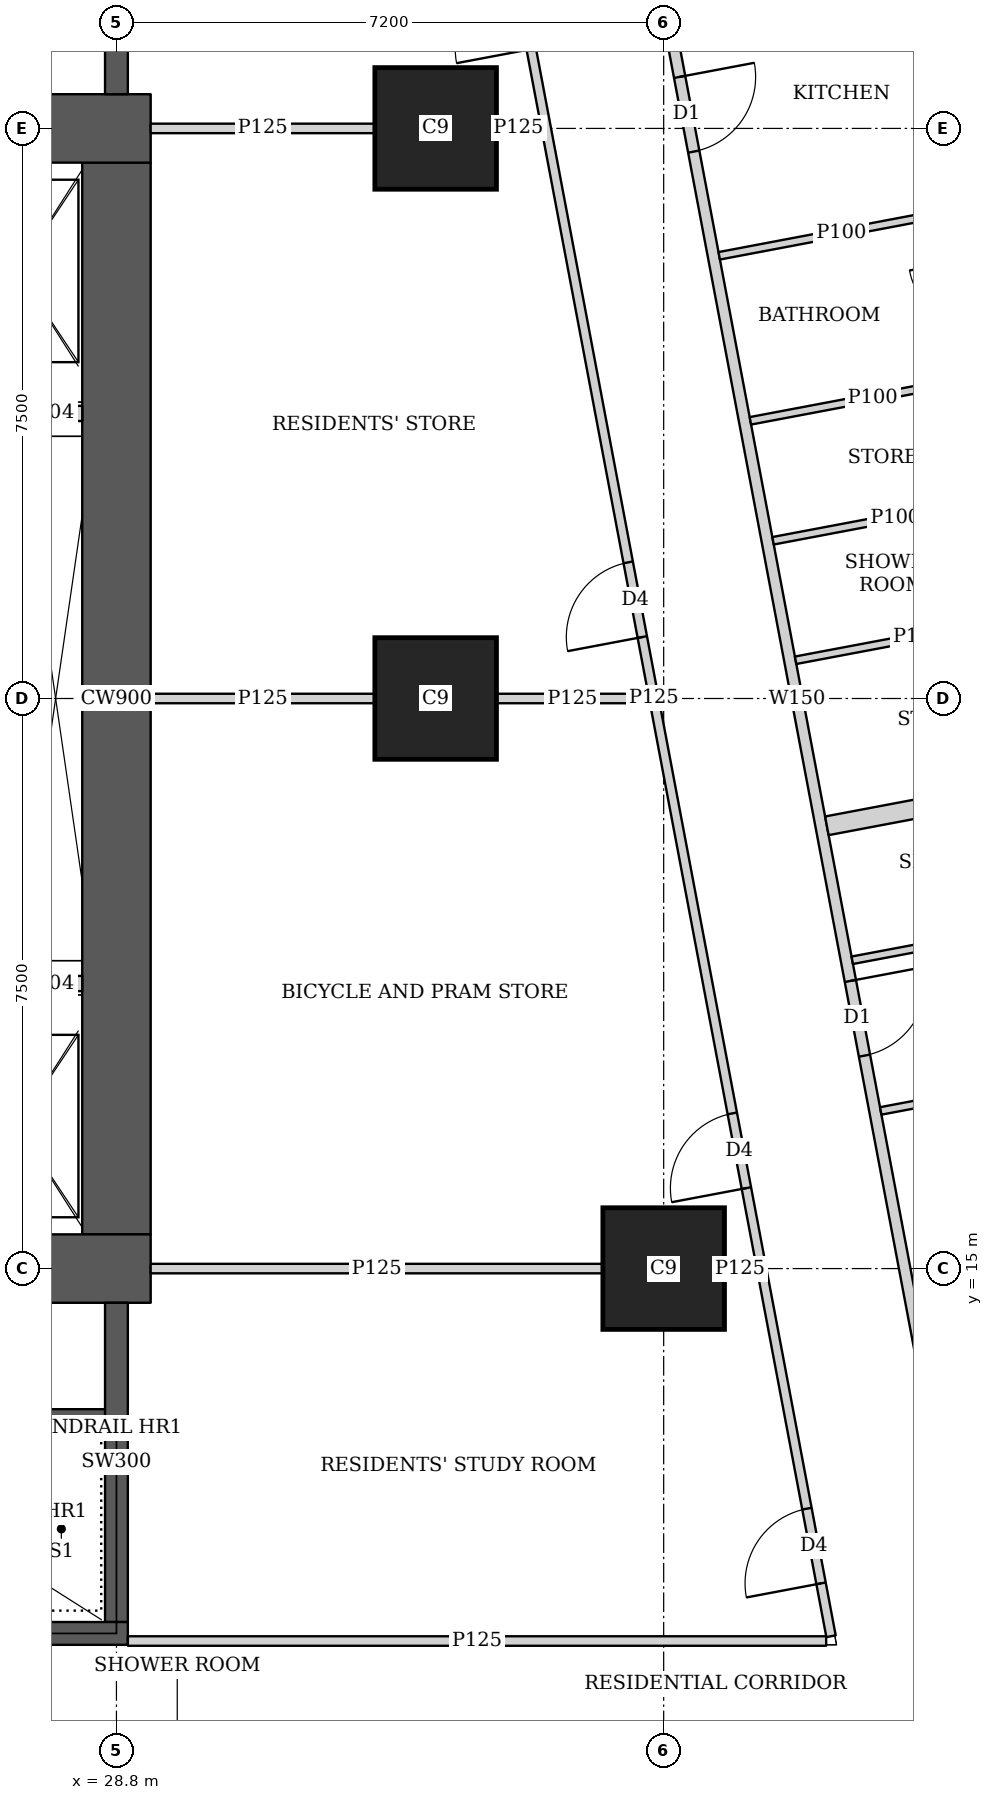
"""IFC4 building model, lengths in metres.
Left out: names, types, materials, properties, quantities, classifications, styles, units other than length and angle.
Written with IfcOpenShell. Run it as: python <this file> out.ifc"""

import sys

from ifc_helpers import new_model, si_unit, direction, frame, frame_2d, origin, origin_2d, place, context, subcontext, project, spatial, rectangle, extrude, element, fill, save


model = new_model("IFC4")
c1 = context("Model", 3, precision=1e-05, world=origin(), true_north=direction((0.0, 1.0)))
c2 = subcontext(c1, "Body", "Model", "MODEL_VIEW")
j1 = project(units=[si_unit("LENGTHUNIT", "METRE"), si_unit("PLANEANGLEUNIT", "RADIAN")], contexts=[c1])
p1 = place(None, origin())
s1 = spatial("IfcSite", under=j1, at=p1, CompositionType="ELEMENT")
p2 = place(p1, origin())
s2 = spatial("IfcBuilding", under=s1, at=p2, CompositionType="ELEMENT")
p3 = place(p2, frame((0.0, 0.0, 100.4)))
s3 = spatial("IfcBuildingStorey", under=s2, at=p3, CompositionType="ELEMENT", Elevation=100.4)
for number, where, z_axis, x_axis in (
    (1, (36.0, 15.0, 0.0), (0.0, 0.0, 1.0), (1.0, 0.0, 0.0)),
    (2, (33.0, 22.5, 0.0), (0.0, 0.0, 1.0), (1.0, 0.0, 0.0)),
    (3, (33.0, 30.0, 0.0), (0.0, 0.0, 1.0), (1.0, 0.0, 0.0)),
):
    element("IfcColumn", number, at=place(p3, frame(where, z_axis=z_axis, x_axis=x_axis)), inside=s3, PredefinedType="COLUMN", context=c2, shape_type="SweptSolid", body=[
        extrude(rectangle(XDim=1.6, YDim=1.6, at=origin_2d()), origin(), (0.0, 0.0, 1.0), 3.75),
    ])
p4 = place(p3, frame((13.95, 15.0, 0.0), z_axis=(0.0, 0.0, 1.0), x_axis=(1.0, 0.0, 0.0)))
e4 = element("IfcWall", 4, at=p4, inside=s3, PredefinedType="SHEAR", context=c2, shape_type="SweptSolid", body=[
    extrude(rectangle(XDim=15.3, YDim=0.9, at=frame_2d((7.65, 0.0))), origin(), (0.0, 0.0, 1.0), 3.75),
])
p5 = place(p4, frame((4.45, 0.0, 0.0)))
e5 = element("IfcOpeningElement", 5, at=p5, cuts=e4, PredefinedType="OPENING", context=c2, shape_type="SweptSolid", body=[
    extrude(rectangle(XDim=1.8, YDim=2.1, at=frame_2d((0.9, 1.05))), frame((0.0, 0.46, 0.0), z_axis=(0.0, -1.0, 0.0), x_axis=(1.0, 0.0, 0.0)), (0.0, 0.0, 1.0), 0.92),
])
p6 = place(p4, frame((10.7, 0.0, 0.0)))
e6 = element("IfcOpeningElement", 6, at=p6, cuts=e4, PredefinedType="OPENING", context=c2, shape_type="SweptSolid", body=[
    extrude(rectangle(XDim=1.1, YDim=2.1, at=frame_2d((0.55, 1.05))), frame((0.0, 0.46, 0.0), z_axis=(0.0, -1.0, 0.0), x_axis=(1.0, 0.0, 0.0)), (0.0, 0.0, 1.0), 0.92),
])
p7 = place(p3, frame((13.95, 30.0, 0.0), z_axis=(0.0, 0.0, 1.0), x_axis=(1.0, 0.0, 0.0)))
e7 = element("IfcWall", 7, at=p7, inside=s3, PredefinedType="SHEAR", context=c2, shape_type="SweptSolid", body=[
    extrude(rectangle(XDim=15.3, YDim=0.9, at=frame_2d((7.65, 0.0))), origin(), (0.0, 0.0, 1.0), 3.75),
])
p8 = place(p7, frame((4.45, 0.0, 0.0)))
e8 = element("IfcOpeningElement", 8, at=p8, cuts=e7, PredefinedType="OPENING", context=c2, shape_type="SweptSolid", body=[
    extrude(rectangle(XDim=1.8, YDim=2.1, at=frame_2d((0.9, 1.05))), frame((0.0, 0.46, 0.0), z_axis=(0.0, -1.0, 0.0), x_axis=(1.0, 0.0, 0.0)), (0.0, 0.0, 1.0), 0.92),
])
p9 = place(p7, frame((10.7, 0.0, 0.0)))
e9 = element("IfcOpeningElement", 9, at=p9, cuts=e7, PredefinedType="OPENING", context=c2, shape_type="SweptSolid", body=[
    extrude(rectangle(XDim=1.1, YDim=2.1, at=frame_2d((0.55, 1.05))), frame((0.0, 0.46, 0.0), z_axis=(0.0, -1.0, 0.0), x_axis=(1.0, 0.0, 0.0)), (0.0, 0.0, 1.0), 0.92),
])
p10 = place(p3, frame((28.8, 15.45, 0.0), z_axis=(0.0, 0.0, 1.0), x_axis=(0.0, 1.0, 0.0)))
e10 = element("IfcWall", 10, at=p10, inside=s3, PredefinedType="SHEAR", context=c2, shape_type="SweptSolid", body=[
    extrude(rectangle(XDim=14.1, YDim=0.9, at=frame_2d((7.05, 0.0))), origin(), (0.0, 0.0, 1.0), 3.75),
])
p11 = place(p3, frame((21.45, 10.2, 0.0), z_axis=(0.0, 0.0, 1.0), x_axis=(1.0, 0.0, 0.0)))
e11 = element("IfcWall", 11, at=p11, inside=s3, PredefinedType="SHEAR", context=c2, shape_type="SweptSolid", body=[
    extrude(rectangle(XDim=7.5, YDim=0.3, at=frame_2d((3.75, 0.0))), origin(), (0.0, 0.0, 1.0), 3.75),
])
p12 = place(p11, frame((0.5, 0.0, 0.0)))
e12 = element("IfcOpeningElement", 12, at=p12, cuts=e11, PredefinedType="OPENING", context=c2, shape_type="SweptSolid", body=[
    extrude(rectangle(XDim=1.1, YDim=2.1, at=frame_2d((0.55, 1.05))), frame((0.0, 0.16, 0.0), z_axis=(0.0, -1.0, 0.0), x_axis=(1.0, 0.0, 0.0)), (0.0, 0.0, 1.0), 0.32),
])
for number, where, z_axis, x_axis in (
    (13, (28.8, 10.35, 0.0), (0.0, 0.0, 1.0), (0.0, 1.0, 0.0)),
    (14, (28.8, 30.45, 0.0), (0.0, 0.0, 1.0), (0.0, 1.0, 0.0)),
):
    element("IfcWall", number, at=place(p3, frame(where, z_axis=z_axis, x_axis=x_axis)), inside=s3, PredefinedType="SHEAR", context=c2, shape_type="SweptSolid", body=[
        extrude(rectangle(XDim=4.2, YDim=0.3, at=frame_2d((2.1, 0.0))), origin(), (0.0, 0.0, 1.0), 3.75),
    ])
p13 = place(p3, frame((33.382, 45.65, 0.0), z_axis=(0.0, 0.0, 1.0), x_axis=(0.185593544777, -0.982626600565, 0.0)))
e15 = element("IfcWall", 15, at=p13, inside=s3, PredefinedType="SOLIDWALL", context=c2, shape_type="SweptSolid", body=[
    extrude(rectangle(XDim=47.118, YDim=0.15, at=frame_2d((23.559, 0.0))), origin(), (0.0, 0.0, 1.0), 2.2),
])
p14 = place(p13, frame((10.662, 0.0, 0.0)))
e16 = element("IfcOpeningElement", 16, at=p14, cuts=e15, PredefinedType="OPENING", context=c2, shape_type="SweptSolid", body=[
    extrude(rectangle(XDim=1.0, YDim=2.1, at=frame_2d((0.5, 1.05))), frame((0.0, 0.085, 0.0), z_axis=(0.0, -1.0, 0.0), x_axis=(1.0, 0.0, 0.0)), (0.0, 0.0, 1.0), 0.17),
])
p15 = place(p13, frame((15.237, 0.0, 0.0)))
e17 = element("IfcOpeningElement", 17, at=p15, cuts=e15, PredefinedType="OPENING", context=c2, shape_type="SweptSolid", body=[
    extrude(rectangle(XDim=1.0, YDim=2.1, at=frame_2d((0.5, 1.05))), frame((0.0, 0.085, 0.0), z_axis=(0.0, -1.0, 0.0), x_axis=(1.0, 0.0, 0.0)), (0.0, 0.0, 1.0), 0.17),
])
p16 = place(p13, frame((27.341, 0.0, 0.0)))
e18 = element("IfcOpeningElement", 18, at=p16, cuts=e15, PredefinedType="OPENING", context=c2, shape_type="SweptSolid", body=[
    extrude(rectangle(XDim=1.0, YDim=2.1, at=frame_2d((0.5, 1.05))), frame((0.0, 0.085, 0.0), z_axis=(0.0, -1.0, 0.0), x_axis=(1.0, 0.0, 0.0)), (0.0, 0.0, 1.0), 0.17),
])
p17 = place(p13, frame((33.833, 0.0, 0.0)))
e19 = element("IfcOpeningElement", 19, at=p17, cuts=e15, PredefinedType="OPENING", context=c2, shape_type="SweptSolid", body=[
    extrude(rectangle(XDim=1.0, YDim=2.1, at=frame_2d((0.5, 1.05))), frame((0.0, 0.085, 0.0), z_axis=(0.0, -1.0, 0.0), x_axis=(1.0, 0.0, 0.0)), (0.0, 0.0, 1.0), 0.17),
])
p18 = place(p3, frame((39.948, 28.933, 0.0), z_axis=(0.0, 0.0, 1.0), x_axis=(-0.982542259571, -0.186039533857, 0.0)))
e20 = element("IfcWall", 20, at=p18, inside=s3, PredefinedType="PARTITIONING", context=c2, shape_type="SweptSolid", body=[
    extrude(rectangle(XDim=3.274, YDim=0.1, at=frame_2d((1.637, 0.0))), origin(), (0.0, 0.0, 1.0), 3.5),
])
p19 = place(p3, frame((40.656, 25.183, 0.0), z_axis=(0.0, 0.0, 1.0), x_axis=(-0.982596739811, -0.18575157311, 0.0)))
e21 = element("IfcWall", 21, at=p19, inside=s3, PredefinedType="PARTITIONING", context=c2, shape_type="SweptSolid", body=[
    extrude(rectangle(XDim=3.274, YDim=0.1, at=frame_2d((1.637, 0.0))), origin(), (0.0, 0.0, 1.0), 3.5),
])
p20 = place(p3, frame((40.358, 26.761, 0.0), z_axis=(0.0, 0.0, 1.0), x_axis=(-0.982607776398, -0.185693181787, 0.0)))
e22 = element("IfcWall", 22, at=p20, inside=s3, PredefinedType="PARTITIONING", context=c2, shape_type="SweptSolid", body=[
    extrude(rectangle(XDim=3.274, YDim=0.1, at=frame_2d((1.637, 0.0))), origin(), (0.0, 0.0, 1.0), 3.5),
])
p21 = place(p3, frame((40.954, 23.61, 0.0), z_axis=(0.0, 0.0, 1.0), x_axis=(-0.982661397469, -0.185409217473, 0.0)))
e23 = element("IfcWall", 23, at=p21, inside=s3, PredefinedType="PARTITIONING", context=c2, shape_type="SweptSolid", body=[
    extrude(rectangle(XDim=3.275, YDim=0.1, at=frame_2d((1.637, 0.0))), origin(), (0.0, 0.0, 1.0), 2.5),
])
p22 = place(p3, frame((41.798, 19.682, 0.0), z_axis=(0.0, 0.0, 1.0), x_axis=(-0.982656183703, -0.185436848091, 0.0)))
e24 = element("IfcWall", 24, at=p22, inside=s3, PredefinedType="PARTITIONING", context=c2, shape_type="SweptSolid", body=[
    extrude(rectangle(XDim=3.376, YDim=0.1, at=frame_2d((1.688, 0.0))), origin(), (0.0, 0.0, 1.0), 3.5),
])
p23 = place(p3, frame((42.074, 17.682, 0.0), z_axis=(0.0, 0.0, 1.0), x_axis=(-0.982620626894, -0.185625169636, 0.0)))
e25 = element("IfcWall", 25, at=p23, inside=s3, PredefinedType="PARTITIONING", context=c2, shape_type="SweptSolid", body=[
    extrude(rectangle(XDim=3.275, YDim=0.1, at=frame_2d((1.637, 0.0))), origin(), (0.0, 0.0, 1.0), 3.5),
])
p24 = place(p23, frame((1.201, 0.0, 0.0)))
e26 = element("IfcOpeningElement", 26, at=p24, cuts=e25, PredefinedType="OPENING", context=c2, shape_type="SweptSolid", body=[
    extrude(rectangle(XDim=0.9, YDim=2.1, at=frame_2d((0.45, 1.05))), frame((0.0, 0.06, 0.0), z_axis=(0.0, -1.0, 0.0), x_axis=(1.0, 0.0, 0.0)), (0.0, 0.0, 1.0), 0.12),
])
p25 = place(p3, frame((42.593, 21.665, 0.0), z_axis=(0.0, 0.0, 1.0), x_axis=(-0.982612837616, -0.185666398014, 0.0)))
e27 = element("IfcWall", 27, at=p25, inside=s3, PredefinedType="SOLIDWALL", context=c2, shape_type="SweptSolid", body=[
    extrude(rectangle(XDim=4.525, YDim=0.25, at=frame_2d((2.262, 0.0))), origin(), (0.0, 0.0, 1.0), 2.5),
])
p26 = place(p3, frame((28.95, 10.1, 0.0), z_axis=(0.0, 0.0, 1.0), x_axis=(1.0, 0.0, 0.0)))
e28 = element("IfcWall", 28, at=p26, inside=s3, PredefinedType="PARTITIONING", context=c2, shape_type="SweptSolid", body=[
    extrude(rectangle(XDim=9.188, YDim=0.125, at=frame_2d((4.594, 0.0))), origin(), (0.0, 0.0, 1.0), 3.5),
])
p27 = place(p3, frame((38.202, 10.163, 0.0), z_axis=(0.0, 0.0, 1.0), x_axis=(-0.185610321132, 0.982623431783, 0.0)))
e29 = element("IfcWall", 29, at=p27, inside=s3, PredefinedType="PARTITIONING", context=c2, shape_type="SweptSolid", body=[
    extrude(rectangle(XDim=25.111, YDim=0.125, at=frame_2d((12.556, 0.0))), origin(), (0.0, 0.0, 1.0), 2.5),
])
p28 = place(p27, frame((0.708, 0.0, 0.0)))
e30 = element("IfcOpeningElement", 30, at=p28, cuts=e29, PredefinedType="OPENING", context=c2, shape_type="SweptSolid", body=[
    extrude(rectangle(XDim=1.0, YDim=2.1, at=frame_2d((0.5, 1.05))), frame((0.0, 0.073, 0.0), z_axis=(0.0, -1.0, 0.0), x_axis=(1.0, 0.0, 0.0)), (0.0, 0.0, 1.0), 0.145),
])
p29 = place(p27, frame((6.0, 0.0, 0.0)))
e31 = element("IfcOpeningElement", 31, at=p29, cuts=e29, PredefinedType="OPENING", context=c2, shape_type="SweptSolid", body=[
    extrude(rectangle(XDim=1.0, YDim=2.1, at=frame_2d((0.5, 1.05))), frame((0.0, 0.073, 0.0), z_axis=(0.0, -1.0, 0.0), x_axis=(1.0, 0.0, 0.0)), (0.0, 0.0, 1.0), 0.145),
])
p30 = place(p27, frame((13.378, 0.0, 0.0)))
e32 = element("IfcOpeningElement", 32, at=p30, cuts=e29, PredefinedType="OPENING", context=c2, shape_type="SweptSolid", body=[
    extrude(rectangle(XDim=1.0, YDim=2.1, at=frame_2d((0.5, 1.05))), frame((0.0, 0.073, 0.0), z_axis=(0.0, -1.0, 0.0), x_axis=(1.0, 0.0, 0.0)), (0.0, 0.0, 1.0), 0.145),
])
p31 = place(p27, frame((21.25, 0.0, 0.0)))
e33 = element("IfcOpeningElement", 33, at=p31, cuts=e29, PredefinedType="OPENING", context=c2, shape_type="SweptSolid", body=[
    extrude(rectangle(XDim=1.0, YDim=2.1, at=frame_2d((0.5, 1.05))), frame((0.0, 0.073, 0.0), z_axis=(0.0, -1.0, 0.0), x_axis=(1.0, 0.0, 0.0)), (0.0, 0.0, 1.0), 0.145),
])
p32 = place(p3, frame((29.25, 15.0, 0.0), z_axis=(0.0, 0.0, 1.0), x_axis=(1.0, 0.0, 0.0)))
e34 = element("IfcWall", 34, at=p32, inside=s3, PredefinedType="PARTITIONING", context=c2, shape_type="SweptSolid", body=[
    extrude(rectangle(XDim=5.949, YDim=0.125, at=frame_2d((2.975, 0.0))), origin(), (0.0, 0.0, 1.0), 3.5),
])
p33 = place(p3, frame((36.801, 15.0, 0.0), z_axis=(0.0, 0.0, 1.0), x_axis=(1.0, 0.0, 0.0)))
e35 = element("IfcWall", 35, at=p33, inside=s3, PredefinedType="PARTITIONING", context=c2, shape_type="SweptSolid", body=[
    extrude(rectangle(XDim=0.412, YDim=0.125, at=frame_2d((0.206, 0.0))), origin(), (0.0, 0.0, 1.0), 3.5),
])
p34 = place(p3, frame((29.25, 22.5, 0.0), z_axis=(0.0, 0.0, 1.0), x_axis=(1.0, 0.0, 0.0)))
e36 = element("IfcWall", 36, at=p34, inside=s3, PredefinedType="PARTITIONING", context=c2, shape_type="SweptSolid", body=[
    extrude(rectangle(XDim=2.949, YDim=0.125, at=frame_2d((1.475, 0.0))), origin(), (0.0, 0.0, 1.0), 3.5),
])
p35 = place(p3, frame((33.801, 22.5, 0.0), z_axis=(0.0, 0.0, 1.0), x_axis=(1.0, 0.0, 0.0)))
e37 = element("IfcWall", 37, at=p35, inside=s3, PredefinedType="PARTITIONING", context=c2, shape_type="SweptSolid", body=[
    extrude(rectangle(XDim=1.995, YDim=0.125, at=frame_2d((0.998, 0.0))), origin(), (0.0, 0.0, 1.0), 2.5),
])
p36 = place(p3, frame((29.25, 30.0, 0.0), z_axis=(0.0, 0.0, 1.0), x_axis=(1.0, 0.0, 0.0)))
e38 = element("IfcWall", 38, at=p36, inside=s3, PredefinedType="PARTITIONING", context=c2, shape_type="SweptSolid", body=[
    extrude(rectangle(XDim=2.949, YDim=0.125, at=frame_2d((1.475, 0.0))), origin(), (0.0, 0.0, 1.0), 3.5),
])
p37 = place(p3, frame((33.801, 30.0, 0.0), z_axis=(0.0, 0.0, 1.0), x_axis=(1.0, 0.0, 0.0)))
e39 = element("IfcWall", 39, at=p37, inside=s3, PredefinedType="PARTITIONING", context=c2, shape_type="SweptSolid", body=[
    extrude(rectangle(XDim=0.578, YDim=0.125, at=frame_2d((0.289, 0.0))), origin(), (0.0, 0.0, 1.0), 2.5),
])
p38 = place(p3, frame((23.0, 13.05, 0.0), z_axis=(0.0, 0.0, 1.0), x_axis=(1.0, 0.0, 0.0)))
e40 = element("IfcWall", 40, at=p38, inside=s3, PredefinedType="SHEAR", context=c2, shape_type="SweptSolid", body=[
    extrude(rectangle(XDim=5.8, YDim=0.2, at=frame_2d((2.9, 0.0))), origin(), (0.0, 0.0, 1.0), 3.75),
])
for number, where, z_axis, x_axis in (
    (41, (27.4, 18.75, 0.0), (0.0, 0.0, 1.0), (1.0, 0.0, 0.0)),
    (42, (27.4, 26.25, 0.0), (0.0, 0.0, 1.0), (1.0, 0.0, 0.0)),
):
    element("IfcWall", number, at=place(p3, frame(where, z_axis=z_axis, x_axis=x_axis)), inside=s3, PredefinedType="SOLIDWALL", context=c2, shape_type="SweptSolid", body=[
        extrude(rectangle(XDim=0.95, YDim=0.2, at=frame_2d((0.475, 0.0))), origin(), (0.0, 0.0, 1.0), 3.5),
    ])
p39 = place(p15, origin())
e43 = element("IfcDoor", 43, at=p39, inside=s3, OperationType="SINGLE_SWING_LEFT", PredefinedType="DOOR", context=c2, shape_type="SweptSolid", body=[
    extrude(rectangle(XDim=1.0, YDim=2.1, at=frame_2d((0.5, 1.05))), frame((0.0, 0.025, 0.0), z_axis=(0.0, -1.0, 0.0), x_axis=(1.0, 0.0, 0.0)), (0.0, 0.0, 1.0), 0.05),
])
fill(e17, e43)
p40 = place(p16, origin())
e44 = element("IfcDoor", 44, at=p40, inside=s3, OperationType="SINGLE_SWING_LEFT", PredefinedType="DOOR", context=c2, shape_type="SweptSolid", body=[
    extrude(rectangle(XDim=1.0, YDim=2.1, at=frame_2d((0.5, 1.05))), frame((0.0, 0.025, 0.0), z_axis=(0.0, -1.0, 0.0), x_axis=(1.0, 0.0, 0.0)), (0.0, 0.0, 1.0), 0.05),
])
fill(e18, e44)
p41 = place(p28, origin())
e45 = element("IfcDoor", 45, at=p41, inside=s3, OperationType="SINGLE_SWING_LEFT", PredefinedType="DOOR", context=c2, shape_type="SweptSolid", body=[
    extrude(rectangle(XDim=1.0, YDim=2.1, at=frame_2d((0.5, 1.05))), frame((0.0, 0.025, 0.0), z_axis=(0.0, -1.0, 0.0), x_axis=(1.0, 0.0, 0.0)), (0.0, 0.0, 1.0), 0.05),
])
fill(e30, e45)
p42 = place(p29, origin())
e46 = element("IfcDoor", 46, at=p42, inside=s3, OperationType="SINGLE_SWING_LEFT", PredefinedType="DOOR", context=c2, shape_type="SweptSolid", body=[
    extrude(rectangle(XDim=1.0, YDim=2.1, at=frame_2d((0.5, 1.05))), frame((0.0, 0.025, 0.0), z_axis=(0.0, -1.0, 0.0), x_axis=(1.0, 0.0, 0.0)), (0.0, 0.0, 1.0), 0.05),
])
fill(e31, e46)
p43 = place(p30, origin())
e47 = element("IfcDoor", 47, at=p43, inside=s3, OperationType="SINGLE_SWING_LEFT", PredefinedType="DOOR", context=c2, shape_type="SweptSolid", body=[
    extrude(rectangle(XDim=1.0, YDim=2.1, at=frame_2d((0.5, 1.05))), frame((0.0, 0.025, 0.0), z_axis=(0.0, -1.0, 0.0), x_axis=(1.0, 0.0, 0.0)), (0.0, 0.0, 1.0), 0.05),
])
fill(e32, e47)
save(model, sys.argv[1])
